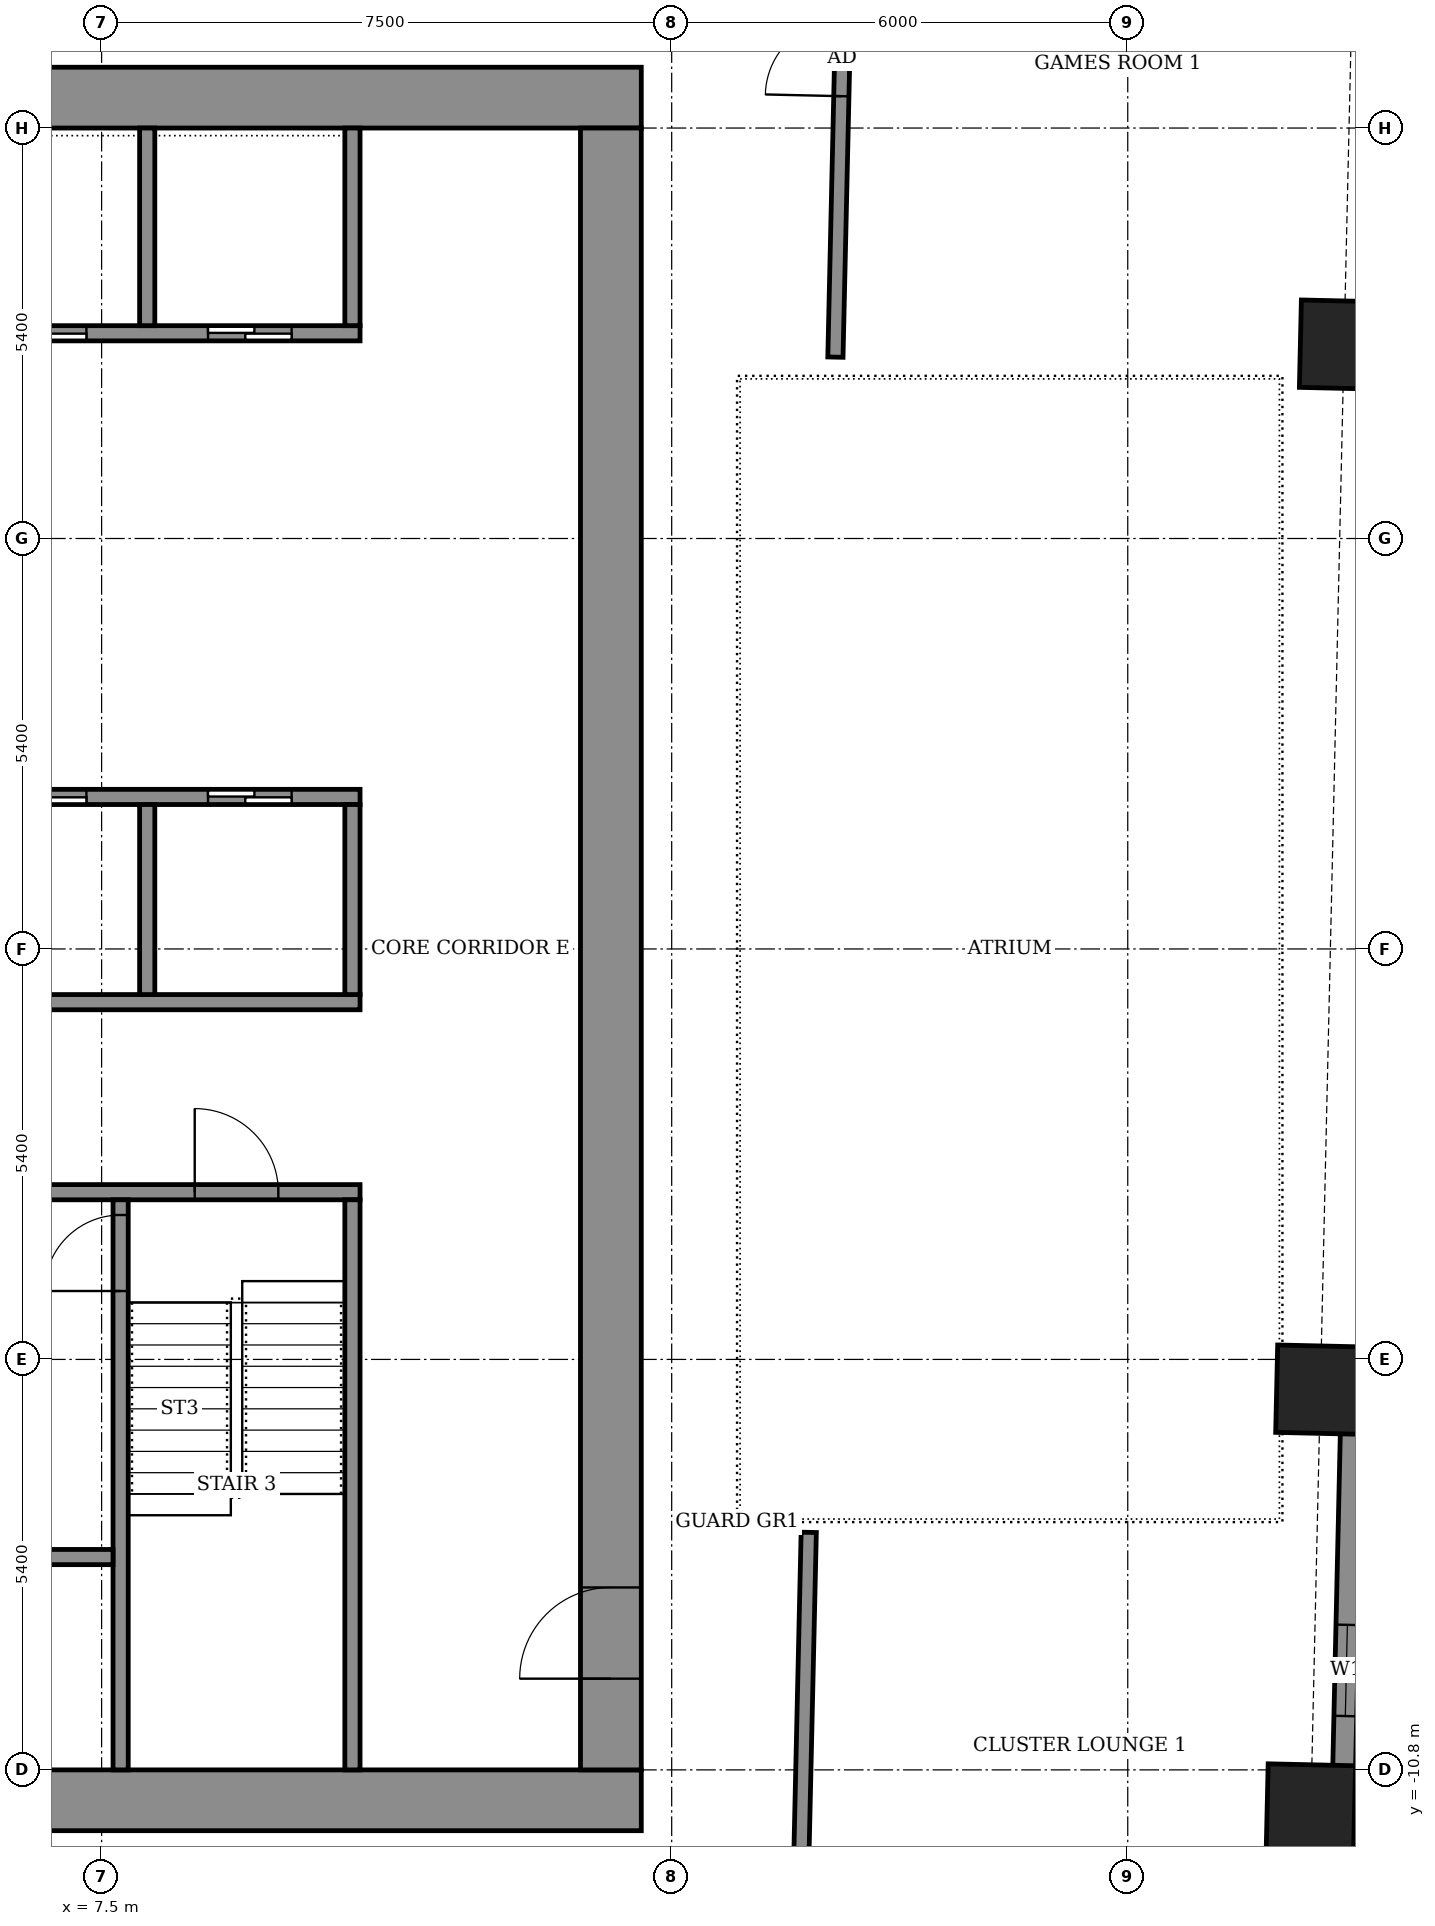
"""IFC4 building model, lengths in metres.
Left out: names, types, materials, properties, quantities, classifications, styles, units other than length and angle.
Written with IfcOpenShell. Run it as: python <this file> out.ifc"""

import sys

from ifc_helpers import new_model, si_unit, direction, frame, frame_2d, origin, origin_2d, place, context, subcontext, project, spatial, rectangle, extrude, element, fill, save


model = new_model("IFC4")
c1 = context("Model", 3, precision=1e-05, world=origin(), true_north=direction((0.0, 1.0)))
c2 = subcontext(c1, "Body", "Model", "MODEL_VIEW")
j1 = project(units=[si_unit("LENGTHUNIT", "METRE"), si_unit("PLANEANGLEUNIT", "RADIAN")], contexts=[c1])
p1 = place(None, origin())
s1 = spatial("IfcSite", under=j1, at=p1, CompositionType="ELEMENT")
p2 = place(p1, origin())
s2 = spatial("IfcBuilding", under=s1, at=p2, CompositionType="ELEMENT")
p3 = place(p2, frame((0.0, 0.0, 205.1)))
s3 = spatial("IfcBuildingStorey", under=s2, at=p3, CompositionType="ELEMENT", Elevation=205.1)
for number, where, z_axis, x_axis in (
    (1, (23.409, -11.308, -0.55), (0.0, 0.0, 1.0), (0.023, 1.0, 0.0)),
    (2, (23.534, -5.798, -0.55), (0.0, 0.0, 1.0), (0.023, 1.0, 0.0)),
    (3, (23.846, 7.95, -0.55), (0.0, 0.0, 1.0), (0.023, 1.0, 0.0)),
):
    element("IfcColumn", number, at=place(p3, frame(where, z_axis=z_axis, x_axis=x_axis)), inside=s3, PredefinedType="COLUMN", context=c2, shape_type="SweptSolid", body=[
        extrude(rectangle(XDim=1.15, YDim=1.15, at=origin_2d()), origin(), (0.0, 0.0, 1.0), 3.6),
    ])
p4 = place(p3, frame((23.713, -16.679, 0.0), z_axis=(0.0, 0.0, 1.0), x_axis=(0.022674801414, 0.999742893639, 0.0)))
e4 = element("IfcWall", 4, at=p4, inside=s3, PredefinedType="SOLIDWALL", context=c2, shape_type="SweptSolid", body=[
    extrude(rectangle(XDim=11.424, YDim=0.3, at=frame_2d((5.712, 0.0))), origin(), (0.0, 0.0, 1.0), 2.55),
])
p5 = place(p4, frame((1.454, 0.0, 0.0)))
e5 = element("IfcOpeningElement", 5, at=p5, cuts=e4, PredefinedType="OPENING", context=c2, shape_type="SweptSolid", body=[
    extrude(rectangle(XDim=1.5, YDim=2.4, at=frame_2d((0.75, 1.2))), frame((0.0, 0.16, 0.0), z_axis=(0.0, -1.0, 0.0), x_axis=(1.0, 0.0, 0.0)), (0.0, 0.0, 1.0), 0.32),
])
p6 = place(p4, frame((6.589, 0.0, 0.9)))
e6 = element("IfcOpeningElement", 6, at=p6, cuts=e4, PredefinedType="OPENING", context=c2, shape_type="SweptSolid", body=[
    extrude(rectangle(XDim=1.2, YDim=1.5, at=frame_2d((0.6, 0.75))), frame((0.0, 0.16, 0.0), z_axis=(0.0, -1.0, 0.0), x_axis=(1.0, 0.0, 0.0)), (0.0, 0.0, 1.0), 0.32),
])
p7 = place(p3, frame((16.684, -12.919, 0.0), z_axis=(0.0, 0.0, 1.0), x_axis=(0.022667483124, 0.999743059595, 0.0)))
e7 = element("IfcWall", 7, at=p7, inside=s3, PredefinedType="PARTITIONING", context=c2, shape_type="SweptSolid", body=[
    extrude(rectangle(XDim=5.245, YDim=0.2, at=frame_2d((2.623, 0.0))), origin(), (0.0, 0.0, 1.0), 3.05),
])
p8 = place(p3, frame((17.154, 7.786, 0.0), z_axis=(0.0, 0.0, 1.0), x_axis=(0.022680883318, 0.999742755679, 0.0)))
e8 = element("IfcWall", 8, at=p8, inside=s3, PredefinedType="PARTITIONING", context=c2, shape_type="SweptSolid", body=[
    extrude(rectangle(XDim=7.664, YDim=0.2, at=frame_2d((3.832, 0.0))), origin(), (0.0, 0.0, 1.0), 3.05),
])
p9 = place(p8, frame((3.434, 0.0, 0.0)))
e9 = element("IfcOpeningElement", 9, at=p9, cuts=e8, PredefinedType="OPENING", context=c2, shape_type="SweptSolid", body=[
    extrude(rectangle(XDim=1.0, YDim=2.1, at=frame_2d((0.5, 1.05))), frame((0.0, 0.11, 0.0), z_axis=(0.0, -1.0, 0.0), x_axis=(1.0, 0.0, 0.0)), (0.0, 0.0, 1.0), 0.22),
])
for number, where, z_axis, x_axis in (
    (10, (-14.6, -11.2, 0.0), (0.0, 0.0, 1.0), (1.0, 0.0, 0.0)),
    (11, (-14.6, 11.2, 0.0), (0.0, 0.0, 1.0), (1.0, 0.0, 0.0)),
):
    element("IfcWall", number, at=place(p3, frame(where, z_axis=z_axis, x_axis=x_axis)), inside=s3, PredefinedType="SHEAR", context=c2, shape_type="SweptSolid", body=[
        extrude(rectangle(XDim=29.2, YDim=0.8, at=frame_2d((14.6, 0.0))), origin(), (0.0, 0.0, 1.0), 3.6),
    ])
p10 = place(p3, frame((14.2, -10.8, 0.0), z_axis=(0.0, 0.0, 1.0), x_axis=(0.0, 1.0, 0.0)))
e12 = element("IfcWall", 12, at=p10, inside=s3, PredefinedType="SHEAR", context=c2, shape_type="SweptSolid", body=[
    extrude(rectangle(XDim=21.6, YDim=0.8, at=frame_2d((10.8, 0.0))), origin(), (0.0, 0.0, 1.0), 3.6),
])
p11 = place(p10, frame((1.2, 0.0, 0.0)))
e13 = element("IfcOpeningElement", 13, at=p11, cuts=e12, PredefinedType="OPENING", context=c2, shape_type="SweptSolid", body=[
    extrude(rectangle(XDim=1.2, YDim=2.1, at=frame_2d((0.6, 1.05))), frame((0.0, 0.41, 0.0), z_axis=(0.0, -1.0, 0.0), x_axis=(1.0, 0.0, 0.0)), (0.0, 0.0, 1.0), 0.82),
])
p12 = place(p3, frame((-10.9, -3.2, 0.0), z_axis=(0.0, 0.0, 1.0), x_axis=(1.0, 0.0, 0.0)))
e14 = element("IfcWall", 14, at=p12, inside=s3, PredefinedType="SHEAR", context=c2, shape_type="SweptSolid", body=[
    extrude(rectangle(XDim=21.8, YDim=0.2, at=frame_2d((10.9, 0.0))), origin(), (0.0, 0.0, 1.0), 3.05),
])
p13 = place(p12, frame((1.075, 0.0, 0.0)))
e15 = element("IfcOpeningElement", 15, at=p13, cuts=e14, PredefinedType="OPENING", context=c2, shape_type="SweptSolid", body=[
    extrude(rectangle(XDim=1.1, YDim=2.1, at=frame_2d((0.55, 1.05))), frame((0.0, 0.11, 0.0), z_axis=(0.0, -1.0, 0.0), x_axis=(1.0, 0.0, 0.0)), (0.0, 0.0, 1.0), 0.22),
])
p14 = place(p12, frame((10.325, 0.0, 0.0)))
e16 = element("IfcOpeningElement", 16, at=p14, cuts=e14, PredefinedType="OPENING", context=c2, shape_type="SweptSolid", body=[
    extrude(rectangle(XDim=1.1, YDim=2.1, at=frame_2d((0.55, 1.05))), frame((0.0, 0.11, 0.0), z_axis=(0.0, -1.0, 0.0), x_axis=(1.0, 0.0, 0.0)), (0.0, 0.0, 1.0), 0.22),
])
p15 = place(p12, frame((19.625, 0.0, 0.0)))
e17 = element("IfcOpeningElement", 17, at=p15, cuts=e14, PredefinedType="OPENING", context=c2, shape_type="SweptSolid", body=[
    extrude(rectangle(XDim=1.1, YDim=2.1, at=frame_2d((0.55, 1.05))), frame((0.0, 0.11, 0.0), z_axis=(0.0, -1.0, 0.0), x_axis=(1.0, 0.0, 0.0)), (0.0, 0.0, 1.0), 0.22),
])
p16 = place(p12, frame((5.7, 0.0, 0.0)))
e18 = element("IfcOpeningElement", 18, at=p16, cuts=e14, PredefinedType="OPENING", context=c2, shape_type="SweptSolid", body=[
    extrude(rectangle(XDim=1.1, YDim=2.1, at=frame_2d((0.55, 1.05))), frame((0.0, 0.11, 0.0), z_axis=(0.0, -1.0, 0.0), x_axis=(1.0, 0.0, 0.0)), (0.0, 0.0, 1.0), 0.22),
])
p17 = place(p12, frame((14.975, 0.0, 0.0)))
e19 = element("IfcOpeningElement", 19, at=p17, cuts=e14, PredefinedType="OPENING", context=c2, shape_type="SweptSolid", body=[
    extrude(rectangle(XDim=1.1, YDim=2.1, at=frame_2d((0.55, 1.05))), frame((0.0, 0.11, 0.0), z_axis=(0.0, -1.0, 0.0), x_axis=(1.0, 0.0, 0.0)), (0.0, 0.0, 1.0), 0.22),
])
p18 = place(p3, frame((-10.9, -0.7, 0.0), z_axis=(0.0, 0.0, 1.0), x_axis=(1.0, 0.0, 0.0)))
e20 = element("IfcWall", 20, at=p18, inside=s3, PredefinedType="SHEAR", context=c2, shape_type="SweptSolid", body=[
    extrude(rectangle(XDim=21.8, YDim=0.2, at=frame_2d((10.9, 0.0))), origin(), (0.0, 0.0, 1.0), 3.05),
])
p19 = place(p3, frame((-10.9, 2.0, 0.0), z_axis=(0.0, 0.0, 1.0), x_axis=(1.0, 0.0, 0.0)))
e21 = element("IfcWall", 21, at=p19, inside=s3, PredefinedType="SHEAR", context=c2, shape_type="SweptSolid", body=[
    extrude(rectangle(XDim=21.8, YDim=0.2, at=frame_2d((10.9, 0.0))), origin(), (0.0, 0.0, 1.0), 3.05),
])
p20 = place(p19, frame((14.4, 0.0, 0.0)))
e22 = element("IfcOpeningElement", 22, at=p20, cuts=e21, PredefinedType="OPENING", context=c2, shape_type="SweptSolid", body=[
    extrude(rectangle(XDim=1.1, YDim=2.1, at=frame_2d((0.55, 1.05))), frame((0.0, 0.11, 0.0), z_axis=(0.0, -1.0, 0.0), x_axis=(1.0, 0.0, 0.0)), (0.0, 0.0, 1.0), 0.22),
])
p21 = place(p19, frame((17.1, 0.0, 0.0)))
e23 = element("IfcOpeningElement", 23, at=p21, cuts=e21, PredefinedType="OPENING", context=c2, shape_type="SweptSolid", body=[
    extrude(rectangle(XDim=1.1, YDim=2.1, at=frame_2d((0.55, 1.05))), frame((0.0, 0.11, 0.0), z_axis=(0.0, -1.0, 0.0), x_axis=(1.0, 0.0, 0.0)), (0.0, 0.0, 1.0), 0.22),
])
p22 = place(p19, frame((19.8, 0.0, 0.0)))
e24 = element("IfcOpeningElement", 24, at=p22, cuts=e21, PredefinedType="OPENING", context=c2, shape_type="SweptSolid", body=[
    extrude(rectangle(XDim=1.1, YDim=2.1, at=frame_2d((0.55, 1.05))), frame((0.0, 0.11, 0.0), z_axis=(0.0, -1.0, 0.0), x_axis=(1.0, 0.0, 0.0)), (0.0, 0.0, 1.0), 0.22),
])
p23 = place(p19, frame((1.675, 0.0, 0.0)))
e25 = element("IfcOpeningElement", 25, at=p23, cuts=e21, PredefinedType="OPENING", context=c2, shape_type="SweptSolid", body=[
    extrude(rectangle(XDim=0.9, YDim=2.1, at=frame_2d((0.45, 1.05))), frame((0.0, 0.11, 0.0), z_axis=(0.0, -1.0, 0.0), x_axis=(1.0, 0.0, 0.0)), (0.0, 0.0, 1.0), 0.22),
])
p24 = place(p19, frame((8.425, 0.0, 0.0)))
e26 = element("IfcOpeningElement", 26, at=p24, cuts=e21, PredefinedType="OPENING", context=c2, shape_type="SweptSolid", body=[
    extrude(rectangle(XDim=0.9, YDim=2.1, at=frame_2d((0.45, 1.05))), frame((0.0, 0.11, 0.0), z_axis=(0.0, -1.0, 0.0), x_axis=(1.0, 0.0, 0.0)), (0.0, 0.0, 1.0), 0.22),
])
p25 = place(p3, frame((-10.9, 8.1, 0.0), z_axis=(0.0, 0.0, 1.0), x_axis=(1.0, 0.0, 0.0)))
e27 = element("IfcWall", 27, at=p25, inside=s3, PredefinedType="SHEAR", context=c2, shape_type="SweptSolid", body=[
    extrude(rectangle(XDim=21.8, YDim=0.2, at=frame_2d((10.9, 0.0))), origin(), (0.0, 0.0, 1.0), 3.05),
])
p26 = place(p25, frame((14.4, 0.0, 0.0)))
e28 = element("IfcOpeningElement", 28, at=p26, cuts=e27, PredefinedType="OPENING", context=c2, shape_type="SweptSolid", body=[
    extrude(rectangle(XDim=1.1, YDim=2.1, at=frame_2d((0.55, 1.05))), frame((0.0, 0.11, 0.0), z_axis=(0.0, -1.0, 0.0), x_axis=(1.0, 0.0, 0.0)), (0.0, 0.0, 1.0), 0.22),
])
p27 = place(p25, frame((17.1, 0.0, 0.0)))
e29 = element("IfcOpeningElement", 29, at=p27, cuts=e27, PredefinedType="OPENING", context=c2, shape_type="SweptSolid", body=[
    extrude(rectangle(XDim=1.1, YDim=2.1, at=frame_2d((0.55, 1.05))), frame((0.0, 0.11, 0.0), z_axis=(0.0, -1.0, 0.0), x_axis=(1.0, 0.0, 0.0)), (0.0, 0.0, 1.0), 0.22),
])
p28 = place(p25, frame((19.8, 0.0, 0.0)))
e30 = element("IfcOpeningElement", 30, at=p28, cuts=e27, PredefinedType="OPENING", context=c2, shape_type="SweptSolid", body=[
    extrude(rectangle(XDim=1.1, YDim=2.1, at=frame_2d((0.55, 1.05))), frame((0.0, 0.11, 0.0), z_axis=(0.0, -1.0, 0.0), x_axis=(1.0, 0.0, 0.0)), (0.0, 0.0, 1.0), 0.22),
])
p29 = place(p25, frame((1.675, 0.0, 0.0)))
e31 = element("IfcOpeningElement", 31, at=p29, cuts=e27, PredefinedType="OPENING", context=c2, shape_type="SweptSolid", body=[
    extrude(rectangle(XDim=0.9, YDim=2.1, at=frame_2d((0.45, 1.05))), frame((0.0, 0.11, 0.0), z_axis=(0.0, -1.0, 0.0), x_axis=(1.0, 0.0, 0.0)), (0.0, 0.0, 1.0), 0.22),
])
p30 = place(p25, frame((8.425, 0.0, 0.0)))
e32 = element("IfcOpeningElement", 32, at=p30, cuts=e27, PredefinedType="OPENING", context=c2, shape_type="SweptSolid", body=[
    extrude(rectangle(XDim=0.9, YDim=2.1, at=frame_2d((0.45, 1.05))), frame((0.0, 0.11, 0.0), z_axis=(0.0, -1.0, 0.0), x_axis=(1.0, 0.0, 0.0)), (0.0, 0.0, 1.0), 0.22),
])
p31 = place(p3, frame((7.75, -10.8, 0.0), z_axis=(0.0, 0.0, 1.0), x_axis=(0.0, 1.0, 0.0)))
e33 = element("IfcWall", 33, at=p31, inside=s3, PredefinedType="SHEAR", context=c2, shape_type="SweptSolid", body=[
    extrude(rectangle(XDim=7.5, YDim=0.2, at=frame_2d((3.75, 0.0))), origin(), (0.0, 0.0, 1.0), 3.05),
])
p32 = place(p31, frame((6.3, 0.0, 0.0)))
e34 = element("IfcOpeningElement", 34, at=p32, cuts=e33, PredefinedType="OPENING", context=c2, shape_type="SweptSolid", body=[
    extrude(rectangle(XDim=1.0, YDim=2.1, at=frame_2d((0.5, 1.05))), frame((0.0, 0.11, 0.0), z_axis=(0.0, -1.0, 0.0), x_axis=(1.0, 0.0, 0.0)), (0.0, 0.0, 1.0), 0.22),
])
p33 = place(p3, frame((10.8, -10.8, 0.0), z_axis=(0.0, 0.0, 1.0), x_axis=(0.0, 1.0, 0.0)))
e35 = element("IfcWall", 35, at=p33, inside=s3, PredefinedType="SHEAR", context=c2, shape_type="SweptSolid", body=[
    extrude(rectangle(XDim=7.5, YDim=0.2, at=frame_2d((3.75, 0.0))), origin(), (0.0, 0.0, 1.0), 3.05),
])
p34 = place(p3, frame((1.6, -8.0, 0.0), z_axis=(0.0, 0.0, 1.0), x_axis=(1.0, 0.0, 0.0)))
e36 = element("IfcWall", 36, at=p34, inside=s3, PredefinedType="SHEAR", context=c2, shape_type="SweptSolid", body=[
    extrude(rectangle(XDim=6.05, YDim=0.2, at=frame_2d((3.025, 0.0))), origin(), (0.0, 0.0, 1.0), 3.05),
])
p35 = place(p34, frame((0.913, 0.0, 0.0)))
e37 = element("IfcOpeningElement", 37, at=p35, cuts=e36, PredefinedType="OPENING", context=c2, shape_type="SweptSolid", body=[
    extrude(rectangle(XDim=1.1, YDim=2.1, at=frame_2d((0.55, 1.05))), frame((0.0, 0.11, 0.0), z_axis=(0.0, -1.0, 0.0), x_axis=(1.0, 0.0, 0.0)), (0.0, 0.0, 1.0), 0.22),
])
p36 = place(p34, frame((4.038, 0.0, 0.0)))
e38 = element("IfcOpeningElement", 38, at=p36, cuts=e36, PredefinedType="OPENING", context=c2, shape_type="SweptSolid", body=[
    extrude(rectangle(XDim=1.1, YDim=2.1, at=frame_2d((0.55, 1.05))), frame((0.0, 0.11, 0.0), z_axis=(0.0, -1.0, 0.0), x_axis=(1.0, 0.0, 0.0)), (0.0, 0.0, 1.0), 0.22),
])
for number, where, z_axis, x_axis in (
    (39, (8.1, -0.6, 0.0), (0.0, 0.0, 1.0), (0.0, 1.0, 0.0)),
    (40, (10.8, -0.6, 0.0), (0.0, 0.0, 1.0), (0.0, 1.0, 0.0)),
):
    element("IfcWall", number, at=place(p3, frame(where, z_axis=z_axis, x_axis=x_axis)), inside=s3, PredefinedType="SHEAR", context=c2, shape_type="SweptSolid", body=[
        extrude(rectangle(XDim=2.5, YDim=0.2, at=frame_2d((1.25, 0.0))), origin(), (0.0, 0.0, 1.0), 3.05),
    ])
for number, where, z_axis, x_axis in (
    (41, (8.1, 8.2, 0.0), (0.0, 0.0, 1.0), (0.0, 1.0, 0.0)),
    (42, (10.8, 8.2, 0.0), (0.0, 0.0, 1.0), (0.0, 1.0, 0.0)),
):
    element("IfcWall", number, at=place(p3, frame(where, z_axis=z_axis, x_axis=x_axis)), inside=s3, PredefinedType="SHEAR", context=c2, shape_type="SweptSolid", body=[
        extrude(rectangle(XDim=2.6, YDim=0.2, at=frame_2d((1.3, 0.0))), origin(), (0.0, 0.0, 1.0), 3.05),
    ])
p37 = place(p6, origin())
e43 = element("IfcWindow", 43, at=p37, inside=s3, PartitioningType="SINGLE_PANEL", PredefinedType="WINDOW", context=c2, shape_type="SweptSolid", body=[
    extrude(rectangle(XDim=1.2, YDim=1.5, at=frame_2d((0.6, 0.75))), frame((0.0, 0.03, 0.0), z_axis=(0.0, -1.0, 0.0), x_axis=(1.0, 0.0, 0.0)), (0.0, 0.0, 1.0), 0.06),
])
fill(e6, e43)
p38 = place(p9, origin())
e44 = element("IfcDoor", 44, at=p38, inside=s3, OperationType="SINGLE_SWING_RIGHT", PredefinedType="DOOR", context=c2, shape_type="SweptSolid", body=[
    extrude(rectangle(XDim=1.0, YDim=2.1, at=frame_2d((0.5, 1.05))), frame((0.0, 0.025, 0.0), z_axis=(0.0, -1.0, 0.0), x_axis=(1.0, 0.0, 0.0)), (0.0, 0.0, 1.0), 0.05),
])
fill(e9, e44)
p39 = place(p11, origin())
e45 = element("IfcDoor", 45, at=p39, inside=s3, OperationType="DOUBLE_DOOR_SINGLE_SWING", PredefinedType="DOOR", context=c2, shape_type="SweptSolid", body=[
    extrude(rectangle(XDim=1.2, YDim=2.1, at=frame_2d((0.6, 1.05))), frame((0.0, 0.025, 0.0), z_axis=(0.0, -1.0, 0.0), x_axis=(1.0, 0.0, 0.0)), (0.0, 0.0, 1.0), 0.05),
])
fill(e13, e45)
p40 = place(p21, origin())
e46 = element("IfcDoor", 46, at=p40, inside=s3, OperationType="SLIDING_TO_LEFT", PredefinedType="DOOR", context=c2, shape_type="SweptSolid", body=[
    extrude(rectangle(XDim=1.1, YDim=2.1, at=frame_2d((0.55, 1.05))), frame((0.0, 0.025, 0.0), z_axis=(0.0, -1.0, 0.0), x_axis=(1.0, 0.0, 0.0)), (0.0, 0.0, 1.0), 0.05),
])
fill(e23, e46)
p41 = place(p22, origin())
e47 = element("IfcDoor", 47, at=p41, inside=s3, OperationType="SLIDING_TO_LEFT", PredefinedType="DOOR", context=c2, shape_type="SweptSolid", body=[
    extrude(rectangle(XDim=1.1, YDim=2.1, at=frame_2d((0.55, 1.05))), frame((0.0, 0.025, 0.0), z_axis=(0.0, -1.0, 0.0), x_axis=(1.0, 0.0, 0.0)), (0.0, 0.0, 1.0), 0.05),
])
fill(e24, e47)
p42 = place(p27, origin())
e48 = element("IfcDoor", 48, at=p42, inside=s3, OperationType="SLIDING_TO_LEFT", PredefinedType="DOOR", context=c2, shape_type="SweptSolid", body=[
    extrude(rectangle(XDim=1.1, YDim=2.1, at=frame_2d((0.55, 1.05))), frame((0.0, 0.025, 0.0), z_axis=(0.0, -1.0, 0.0), x_axis=(1.0, 0.0, 0.0)), (0.0, 0.0, 1.0), 0.05),
])
fill(e29, e48)
p43 = place(p28, origin())
e49 = element("IfcDoor", 49, at=p43, inside=s3, OperationType="SLIDING_TO_LEFT", PredefinedType="DOOR", context=c2, shape_type="SweptSolid", body=[
    extrude(rectangle(XDim=1.1, YDim=2.1, at=frame_2d((0.55, 1.05))), frame((0.0, 0.025, 0.0), z_axis=(0.0, -1.0, 0.0), x_axis=(1.0, 0.0, 0.0)), (0.0, 0.0, 1.0), 0.05),
])
fill(e30, e49)
p44 = place(p15, origin())
e50 = element("IfcDoor", 50, at=p44, inside=s3, OperationType="SINGLE_SWING_RIGHT", PredefinedType="DOOR", context=c2, shape_type="SweptSolid", body=[
    extrude(rectangle(XDim=1.1, YDim=2.1, at=frame_2d((0.55, 1.05))), frame((0.0, 0.025, 0.0), z_axis=(0.0, -1.0, 0.0), x_axis=(1.0, 0.0, 0.0)), (0.0, 0.0, 1.0), 0.05),
])
fill(e17, e50)
p45 = place(p32, origin())
e51 = element("IfcDoor", 51, at=p45, inside=s3, OperationType="SINGLE_SWING_RIGHT", PredefinedType="DOOR", context=c2, shape_type="SweptSolid", body=[
    extrude(rectangle(XDim=1.0, YDim=2.1, at=frame_2d((0.5, 1.05))), frame((0.0, 0.025, 0.0), z_axis=(0.0, -1.0, 0.0), x_axis=(1.0, 0.0, 0.0)), (0.0, 0.0, 1.0), 0.05),
])
fill(e34, e51)
save(model, sys.argv[1])
